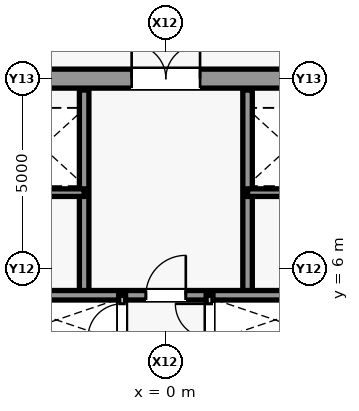
"""IFC4 building model, lengths in metres.
Left out: names, types, materials, properties, quantities, classifications, styles, units other than length and angle.
Written with IfcOpenShell. Run it as: python <this file> out.ifc"""

import sys

from ifc_helpers import new_model, si_unit, direction, frame, frame_2d, origin, place, context, subcontext, project, spatial, rectangle, extrude, source, transform, mapped, element, fill, save


model = new_model("IFC4")
c1 = context("Model", 3, precision=1e-05, world=origin(), true_north=direction((0.0, 1.0)))
c2 = subcontext(c1, "Body", "Model", "MODEL_VIEW")
j1 = project(units=[si_unit("LENGTHUNIT", "METRE"), si_unit("PLANEANGLEUNIT", "RADIAN")], contexts=[c1])
p1 = place(None, origin())
s1 = spatial("IfcSite", under=j1, at=p1, CompositionType="ELEMENT")
p2 = place(p1, origin())
s2 = spatial("IfcBuilding", under=s1, at=p2, CompositionType="ELEMENT")
p3 = place(p2, frame((0.0, 0.0, 17.4)))
s3 = spatial("IfcBuildingStorey", under=s2, at=p3, CompositionType="ELEMENT", Elevation=17.4)
m1 = source(origin(), c2, "Body", "SweptSolid", [
    extrude(rectangle(XDim=9.2, YDim=0.5, at=frame_2d((4.6, 0.0))), origin(), (0.0, 0.0, 1.0), 4.48),
])
p4 = place(p3, frame((-4.6, 11.0, 0.0), z_axis=(0.0, 0.0, 1.0), x_axis=(1.0, 0.0, 0.0)))
e1 = element("IfcWall", 1, at=p4, inside=s3, PredefinedType="SHEAR", context=c2, shape_type="MappedRepresentation", body=[
    mapped(m1, transform((0.0, 0.0, 0.0), scale=1.0)),
])
m2 = source(origin(), c2, "Body", "SweptSolid", [
    extrude(rectangle(XDim=1.8, YDim=2.25, at=frame_2d((0.9, 1.125))), frame((0.0, 0.26, 0.0), z_axis=(0.0, -1.0, 0.0), x_axis=(1.0, 0.0, 0.0)), (0.0, 0.0, 1.0), 0.52),
])
p5 = place(p4, frame((3.7, 0.0, 0.0)))
e2 = element("IfcOpeningElement", 2, at=p5, cuts=e1, PredefinedType="OPENING", context=c2, shape_type="MappedRepresentation", body=[
    mapped(m2, transform((0.0, 0.0, 0.0), scale=1.0)),
])
m3 = source(origin(), c2, "Body", "SweptSolid", [
    extrude(rectangle(XDim=5.4, YDim=0.25, at=frame_2d((2.7, 0.0))), origin(), (0.0, 0.0, 1.0), 4.48),
])
for number, where, z_axis, x_axis in (
    (3, (-2.15, 5.3, 0.0), (0.0, 0.0, 1.0), (0.0, 1.0, 0.0)),
    (4, (2.15, 5.3, 0.0), (0.0, 0.0, 1.0), (0.0, 1.0, 0.0)),
):
    element("IfcWall", number, at=place(p3, frame(where, z_axis=z_axis, x_axis=x_axis)), inside=s3, PredefinedType="SHEAR", context=c2, shape_type="MappedRepresentation", body=[
        mapped(m3, transform((0.0, 0.0, 0.0), scale=1.0)),
    ])
m4 = source(origin(), c2, "Body", "SweptSolid", [
    extrude(rectangle(XDim=2.45, YDim=0.2, at=frame_2d((1.225, 0.0))), origin(), (0.0, 0.0, 1.0), 4.48),
])
for number, where, z_axis, x_axis in (
    (5, (-4.6, 8.0, 0.0), (0.0, 0.0, 1.0), (1.0, 0.0, 0.0)),
    (6, (2.15, 8.0, 0.0), (0.0, 0.0, 1.0), (1.0, 0.0, 0.0)),
):
    element("IfcWall", number, at=place(p3, frame(where, z_axis=z_axis, x_axis=x_axis)), inside=s3, PredefinedType="SHEAR", context=c2, shape_type="MappedRepresentation", body=[
        mapped(m4, transform((0.0, 0.0, 0.0), scale=1.0)),
    ])
m5 = source(origin(), c2, "Body", "SweptSolid", [
    extrude(rectangle(XDim=9.2, YDim=0.25, at=frame_2d((4.6, 0.0))), origin(), (0.0, 0.0, 1.0), 4.48),
])
p6 = place(p3, frame((-4.6, 5.3, 0.0), z_axis=(0.0, 0.0, 1.0), x_axis=(1.0, 0.0, 0.0)))
e7 = element("IfcWall", 7, at=p6, inside=s3, PredefinedType="SHEAR", context=c2, shape_type="MappedRepresentation", body=[
    mapped(m5, transform((0.0, 0.0, 0.0), scale=1.0)),
])
m6 = source(origin(), c2, "Body", "SweptSolid", [
    extrude(rectangle(XDim=1.05, YDim=2.2, at=frame_2d((0.525, 1.1))), frame((0.0, 0.135, 0.0), z_axis=(0.0, -1.0, 0.0), x_axis=(1.0, 0.0, 0.0)), (0.0, 0.0, 1.0), 0.27),
])
p7 = place(p6, frame((4.075, 0.0, 0.0)))
e8 = element("IfcOpeningElement", 8, at=p7, cuts=e7, PredefinedType="OPENING", context=c2, shape_type="MappedRepresentation", body=[
    mapped(m6, transform((0.0, 0.0, 0.0), scale=1.0)),
])
m7 = source(origin(), c2, "Body", "SweptSolid", [
    extrude(rectangle(XDim=10.6, YDim=0.18, at=frame_2d((5.3, 0.0))), origin(), (0.0, 0.0, 1.0), 4.48),
])
p8 = place(p3, frame((-1.15, -5.3, 0.0), z_axis=(0.0, 0.0, 1.0), x_axis=(0.0, 1.0, 0.0)))
e9 = element("IfcWall", 9, at=p8, inside=s3, PredefinedType="PARTITIONING", context=c2, shape_type="MappedRepresentation", body=[
    mapped(m7, transform((0.0, 0.0, 0.0), scale=1.0)),
])
m8 = source(origin(), c2, "Body", "SweptSolid", [
    extrude(rectangle(XDim=0.9, YDim=2.15, at=frame_2d((0.45, 1.075))), frame((0.0, 0.1, 0.0), z_axis=(0.0, -1.0, 0.0), x_axis=(1.0, 0.0, 0.0)), (0.0, 0.0, 1.0), 0.2),
])
p9 = place(p8, frame((4.2, 0.0, 0.0)))
e10 = element("IfcOpeningElement", 10, at=p9, cuts=e9, PredefinedType="OPENING", context=c2, shape_type="MappedRepresentation", body=[
    mapped(m8, transform((0.0, 0.0, 0.0), scale=1.0)),
])
p10 = place(p8, frame((9.475, 0.0, 0.0)))
e11 = element("IfcOpeningElement", 11, at=p10, cuts=e9, PredefinedType="OPENING", context=c2, shape_type="MappedRepresentation", body=[
    mapped(m8, transform((0.0, 0.0, 0.0), scale=1.0)),
])
p11 = place(p3, frame((1.15, -5.3, 0.0), z_axis=(0.0, 0.0, 1.0), x_axis=(0.0, 1.0, 0.0)))
e12 = element("IfcWall", 12, at=p11, inside=s3, PredefinedType="PARTITIONING", context=c2, shape_type="MappedRepresentation", body=[
    mapped(m7, transform((0.0, 0.0, 0.0), scale=1.0)),
])
p12 = place(p11, frame((1.15, 0.0, 0.0)))
e13 = element("IfcOpeningElement", 13, at=p12, cuts=e12, PredefinedType="OPENING", context=c2, shape_type="MappedRepresentation", body=[
    mapped(m8, transform((0.0, 0.0, 0.0), scale=1.0)),
])
p13 = place(p11, frame((4.6, 0.0, 0.0)))
e14 = element("IfcOpeningElement", 14, at=p13, cuts=e12, PredefinedType="OPENING", context=c2, shape_type="MappedRepresentation", body=[
    mapped(m8, transform((0.0, 0.0, 0.0), scale=1.0)),
])
p14 = place(p11, frame((7.65, 0.0, 0.0)))
e15 = element("IfcOpeningElement", 15, at=p14, cuts=e12, PredefinedType="OPENING", context=c2, shape_type="MappedRepresentation", body=[
    mapped(m8, transform((0.0, 0.0, 0.0), scale=1.0)),
])
p15 = place(p11, frame((9.475, 0.0, 0.0)))
e16 = element("IfcOpeningElement", 16, at=p15, cuts=e12, PredefinedType="OPENING", context=c2, shape_type="MappedRepresentation", body=[
    mapped(m8, transform((0.0, 0.0, 0.0), scale=1.0)),
])
m9 = source(origin(), c2, "Body", "SweptSolid", [
    extrude(rectangle(XDim=1.05, YDim=2.2, at=frame_2d((0.525, 1.1))), frame((0.0, 0.025, 0.0), z_axis=(0.0, -1.0, 0.0), x_axis=(1.0, 0.0, 0.0)), (0.0, 0.0, 1.0), 0.05),
])
p16 = place(p7, origin())
e17 = element("IfcDoor", 17, at=p16, inside=s3, OperationType="SINGLE_SWING_RIGHT", PredefinedType="DOOR", context=c2, shape_type="MappedRepresentation", body=[
    mapped(m9, transform((0.0, 0.0, 0.0), scale=1.0)),
])
fill(e8, e17)
m10 = source(origin(), c2, "Body", "SweptSolid", [
    extrude(rectangle(XDim=1.8, YDim=2.25, at=frame_2d((0.9, 1.125))), frame((0.0, 0.025, 0.0), z_axis=(0.0, -1.0, 0.0), x_axis=(1.0, 0.0, 0.0)), (0.0, 0.0, 1.0), 0.05),
])
p17 = place(p5, origin())
e18 = element("IfcDoor", 18, at=p17, inside=s3, OperationType="SINGLE_SWING_RIGHT", PredefinedType="DOOR", context=c2, shape_type="MappedRepresentation", body=[
    mapped(m10, transform((0.0, 0.0, 0.0), scale=1.0)),
])
fill(e2, e18)
m11 = source(origin(), c2, "Body", "SweptSolid", [
    extrude(rectangle(XDim=0.9, YDim=2.15, at=frame_2d((0.45, 1.075))), frame((0.0, 0.025, 0.0), z_axis=(0.0, -1.0, 0.0), x_axis=(1.0, 0.0, 0.0)), (0.0, 0.0, 1.0), 0.05),
])
p18 = place(p10, origin())
e19 = element("IfcDoor", 19, at=p18, inside=s3, OperationType="SINGLE_SWING_LEFT", PredefinedType="DOOR", context=c2, shape_type="MappedRepresentation", body=[
    mapped(m11, transform((0.0, 0.0, 0.0), scale=1.0)),
])
fill(e11, e19)
p19 = place(p15, origin())
e20 = element("IfcDoor", 20, at=p19, inside=s3, OperationType="SINGLE_SWING_RIGHT", PredefinedType="DOOR", context=c2, shape_type="MappedRepresentation", body=[
    mapped(m11, transform((0.0, 0.0, 0.0), scale=1.0)),
])
fill(e16, e20)
save(model, sys.argv[1])
